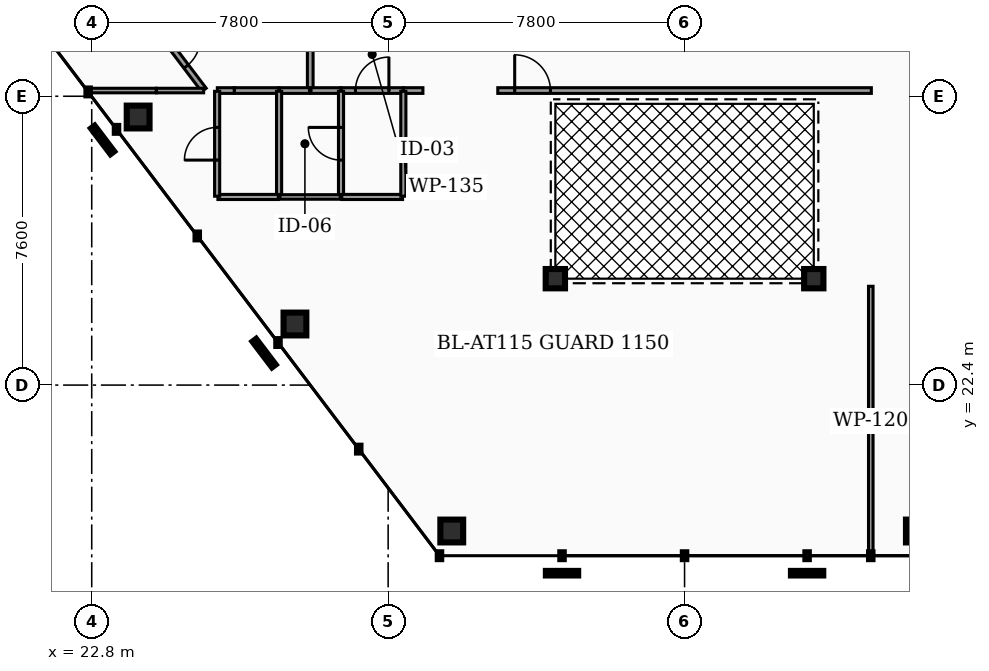
"""IFC4 building model, lengths in metres.
Left out: names, types, materials, properties, quantities, classifications, styles, units other than length and angle.
Written with IfcOpenShell. Run it as: python <this file> out.ifc"""

import sys

from ifc_helpers import new_model, si_unit, direction, frame, frame_2d, origin, origin_2d, place, context, subcontext, project, spatial, rectangle, hollow_rectangle, hollow_circle, extrude, element, fill, save


model = new_model("IFC4")
c1 = context("Model", 3, precision=1e-05, world=origin(), true_north=direction((0.0, 1.0)))
c2 = subcontext(c1, "Body", "Model", "MODEL_VIEW")
j1 = project(units=[si_unit("LENGTHUNIT", "METRE"), si_unit("PLANEANGLEUNIT", "RADIAN")], contexts=[c1])
p1 = place(None, origin())
s1 = spatial("IfcSite", under=j1, at=p1, CompositionType="ELEMENT")
p2 = place(p1, origin())
s2 = spatial("IfcBuilding", under=s1, at=p2, CompositionType="ELEMENT")
p3 = place(p2, frame((0.0, 0.0, 208.76)))
s3 = spatial("IfcBuildingStorey", under=s2, at=p3, CompositionType="ELEMENT", Elevation=208.76)
for number, where, z_axis, x_axis in (
    (1, (24.021, 29.454, 0.0), (0.0, 0.0, 1.0), (1.0, 0.0, 0.0)),
    (2, (28.148, 24.007, 0.0), (0.0, 0.0, 1.0), (1.0, 0.0, 0.0)),
    (3, (32.274, 18.561, 0.0), (0.0, 0.0, 1.0), (1.0, 0.0, 0.0)),
    (4, (44.526, 18.561, 0.0), (0.0, 0.0, 1.0), (1.0, 0.0, 0.0)),
):
    element("IfcColumn", number, at=place(p3, frame(where, z_axis=z_axis, x_axis=x_axis)), inside=s3, PredefinedType="COLUMN", context=c2, shape_type="SweptSolid", body=[
        extrude(hollow_rectangle(XDim=0.6, YDim=0.6, WallThickness=0.03, at=origin_2d()), origin(), (0.0, 0.0, 1.0), 3.18),
    ])
for number, where, z_axis, x_axis in (
    (5, (35.0, 25.2, 0.0), (0.0, 0.0, 1.0), (1.0, 0.0, 0.0)),
    (6, (41.8, 25.2, 0.0), (0.0, 0.0, 1.0), (1.0, 0.0, 0.0)),
):
    element("IfcColumn", number, at=place(p3, frame(where, z_axis=z_axis, x_axis=x_axis)), inside=s3, PredefinedType="COLUMN", context=c2, shape_type="SweptSolid", body=[
        extrude(hollow_circle(Radius=0.254, WallThickness=0.02, at=origin_2d()), origin(), (0.0, 0.0, 1.0), 3.18),
    ])
p4 = place(p3, frame((28.55, 30.17, 0.0), z_axis=(0.0, 0.0, 1.0), x_axis=(0.0, 1.0, 0.0)))
e7 = element("IfcWall", 7, at=p4, inside=s3, PredefinedType="PARTITIONING", context=c2, shape_type="SweptSolid", body=[
    extrude(rectangle(XDim=3.06, YDim=0.15, at=frame_2d((1.53, 0.0))), origin(), (0.0, 0.0, 1.0), 2.235),
])
p5 = place(p4, frame((1.06, 0.0, 0.0)))
e8 = element("IfcOpeningElement", 8, at=p5, cuts=e7, PredefinedType="OPENING", context=c2, shape_type="SweptSolid", body=[
    extrude(rectangle(XDim=0.94, YDim=2.05, at=frame_2d((0.47, 1.025))), frame((0.0, 0.085, 0.0), z_axis=(0.0, -1.0, 0.0), x_axis=(1.0, 0.0, 0.0)), (0.0, 0.0, 1.0), 0.17),
])
p6 = place(p3, frame((29.365, 30.15, 0.0), z_axis=(0.0, 0.0, 1.0), x_axis=(1.0, 0.0, 0.0)))
e9 = element("IfcWall", 9, at=p6, inside=s3, PredefinedType="PARTITIONING", context=c2, shape_type="SweptSolid", body=[
    extrude(rectangle(XDim=1.63, YDim=0.15, at=frame_2d((0.815, 0.0))), origin(), (0.0, 0.0, 1.0), 2.235),
])
p7 = place(p6, frame((0.375, 0.0, 0.0)))
e10 = element("IfcOpeningElement", 10, at=p7, cuts=e9, PredefinedType="OPENING", context=c2, shape_type="SweptSolid", body=[
    extrude(rectangle(XDim=0.88, YDim=2.05, at=frame_2d((0.44, 1.025))), frame((0.0, 0.085, 0.0), z_axis=(0.0, -1.0, 0.0), x_axis=(1.0, 0.0, 0.0)), (0.0, 0.0, 1.0), 0.17),
])
p8 = place(p3, frame((28.57, 30.15, 0.0), z_axis=(0.0, 0.0, 1.0), x_axis=(1.0, 0.0, 0.0)))
e11 = element("IfcWall", 11, at=p8, inside=s3, PredefinedType="PARTITIONING", context=c2, shape_type="SweptSolid", body=[
    extrude(rectangle(XDim=0.785, YDim=0.15, at=frame_2d((0.393, 0.0))), origin(), (0.0, 0.0, 1.0), 2.235),
])
p9 = place(p3, frame((33.485, 30.15, 0.0), z_axis=(0.0, 0.0, 1.0), x_axis=(1.0, 0.0, 0.0)))
e12 = element("IfcWall", 12, at=p9, inside=s3, PredefinedType="PARTITIONING", context=c2, shape_type="SweptSolid", body=[
    extrude(rectangle(XDim=9.83, YDim=0.15, at=frame_2d((4.915, 0.0))), origin(), (0.0, 0.0, 1.0), 2.235),
])
p10 = place(p9, frame((0.445, 0.0, 0.0)))
e13 = element("IfcOpeningElement", 13, at=p10, cuts=e12, PredefinedType="OPENING", context=c2, shape_type="SweptSolid", body=[
    extrude(rectangle(XDim=0.94, YDim=2.05, at=frame_2d((0.47, 1.025))), frame((0.0, 0.085, 0.0), z_axis=(0.0, -1.0, 0.0), x_axis=(1.0, 0.0, 0.0)), (0.0, 0.0, 1.0), 0.17),
])
p11 = place(p3, frame((31.005, 30.15, 0.0), z_axis=(0.0, 0.0, 1.0), x_axis=(1.0, 0.0, 0.0)))
e14 = element("IfcWall", 14, at=p11, inside=s3, PredefinedType="PARTITIONING", context=c2, shape_type="SweptSolid", body=[
    extrude(rectangle(XDim=0.51, YDim=0.15, at=frame_2d((0.255, 0.0))), origin(), (0.0, 0.0, 1.0), 2.235),
])
p12 = place(p3, frame((26.55, 30.15, 0.0), z_axis=(0.0, 0.0, 1.0), x_axis=(1.0, 0.0, 0.0)))
e15 = element("IfcWall", 15, at=p12, inside=s3, PredefinedType="PARTITIONING", context=c2, shape_type="SweptSolid", body=[
    extrude(rectangle(XDim=1.175, YDim=0.15, at=frame_2d((0.587, 0.0))), origin(), (0.0, 0.0, 1.0), 2.235),
])
p13 = place(p3, frame((26.105, 30.15, 0.0), z_axis=(0.0, 0.0, 1.0), x_axis=(1.0, 0.0, 0.0)))
e16 = element("IfcWall", 16, at=p13, inside=s3, PredefinedType="PARTITIONING", context=c2, shape_type="SweptSolid", body=[
    extrude(rectangle(XDim=0.445, YDim=0.15, at=frame_2d((0.223, 0.0))), origin(), (0.0, 0.0, 1.0), 2.235),
])
p14 = place(p3, frame((27.735, 30.15, 0.0), z_axis=(0.0, 0.0, 1.0), x_axis=(1.0, 0.0, 0.0)))
e17 = element("IfcWall", 17, at=p14, inside=s3, PredefinedType="PARTITIONING", context=c2, shape_type="SweptSolid", body=[
    extrude(rectangle(XDim=0.795, YDim=0.15, at=frame_2d((0.397, 0.0))), origin(), (0.0, 0.0, 1.0), 2.235),
])
p15 = place(p3, frame((24.25, 32.15, 0.0), z_axis=(0.0, 0.0, 1.0), x_axis=(0.60385391082, -0.797095009637, 0.0)))
e18 = element("IfcWall", 18, at=p15, inside=s3, PredefinedType="PARTITIONING", context=c2, shape_type="SweptSolid", body=[
    extrude(rectangle(XDim=2.489, YDim=0.15, at=frame_2d((1.245, 0.0))), origin(), (0.0, 0.0, 1.0), 2.235),
])
p16 = place(p15, frame((0.775, 0.0, 0.0)))
e19 = element("IfcOpeningElement", 19, at=p16, cuts=e18, PredefinedType="OPENING", context=c2, shape_type="SweptSolid", body=[
    extrude(rectangle(XDim=0.94, YDim=2.05, at=frame_2d((0.47, 1.025))), frame((0.0, 0.085, 0.0), z_axis=(0.0, -1.0, 0.0), x_axis=(1.0, 0.0, 0.0)), (0.0, 0.0, 1.0), 0.17),
])
p17 = place(p3, frame((29.36, 27.37, 0.0), z_axis=(0.0, 0.0, 1.0), x_axis=(0.0, 1.0, 0.0)))
e20 = element("IfcWall", 20, at=p17, inside=s3, PredefinedType="PARTITIONING", context=c2, shape_type="SweptSolid", body=[
    extrude(rectangle(XDim=2.76, YDim=0.135, at=frame_2d((1.38, 0.0))), origin(), (0.0, 0.0, 1.0), 2.235),
])
p18 = place(p17, frame((0.95, 0.0, 0.0)))
e21 = element("IfcOpeningElement", 21, at=p18, cuts=e20, PredefinedType="OPENING", context=c2, shape_type="SweptSolid", body=[
    extrude(rectangle(XDim=0.86, YDim=2.05, at=frame_2d((0.43, 1.025))), frame((0.0, 0.077, 0.0), z_axis=(0.0, -1.0, 0.0), x_axis=(1.0, 0.0, 0.0)), (0.0, 0.0, 1.0), 0.155),
])
p19 = place(p3, frame((29.38, 27.35, 0.0), z_axis=(0.0, 0.0, 1.0), x_axis=(1.0, 0.0, 0.0)))
e22 = element("IfcWall", 22, at=p19, inside=s3, PredefinedType="PARTITIONING", context=c2, shape_type="SweptSolid", body=[
    extrude(rectangle(XDim=1.6, YDim=0.135, at=frame_2d((0.8, 0.0))), origin(), (0.0, 0.0, 1.0), 2.235),
])
for number, where, z_axis, x_axis in (
    (23, (31.0, 27.37, 0.0), (0.0, 0.0, 1.0), (0.0, 1.0, 0.0)),
    (24, (27.73, 27.37, 0.0), (0.0, 0.0, 1.0), (0.0, 1.0, 0.0)),
):
    element("IfcWall", number, at=place(p3, frame(where, z_axis=z_axis, x_axis=x_axis)), inside=s3, PredefinedType="PARTITIONING", context=c2, shape_type="SweptSolid", body=[
        extrude(rectangle(XDim=2.76, YDim=0.135, at=frame_2d((1.38, 0.0))), origin(), (0.0, 0.0, 1.0), 2.235),
    ])
p20 = place(p3, frame((26.12, 27.35, 0.0), z_axis=(0.0, 0.0, 1.0), x_axis=(1.0, 0.0, 0.0)))
e25 = element("IfcWall", 25, at=p20, inside=s3, PredefinedType="PARTITIONING", context=c2, shape_type="SweptSolid", body=[
    extrude(rectangle(XDim=1.59, YDim=0.135, at=frame_2d((0.795, 0.0))), origin(), (0.0, 0.0, 1.0), 2.235),
])
p21 = place(p3, frame((26.1, 27.37, 0.0), z_axis=(0.0, 0.0, 1.0), x_axis=(0.0, 1.0, 0.0)))
e26 = element("IfcWall", 26, at=p21, inside=s3, PredefinedType="PARTITIONING", context=c2, shape_type="SweptSolid", body=[
    extrude(rectangle(XDim=2.76, YDim=0.135, at=frame_2d((1.38, 0.0))), origin(), (0.0, 0.0, 1.0), 2.235),
])
p22 = place(p21, frame((0.95, 0.0, 0.0)))
e27 = element("IfcOpeningElement", 27, at=p22, cuts=e26, PredefinedType="OPENING", context=c2, shape_type="SweptSolid", body=[
    extrude(rectangle(XDim=0.86, YDim=2.05, at=frame_2d((0.43, 1.025))), frame((0.0, 0.077, 0.0), z_axis=(0.0, -1.0, 0.0), x_axis=(1.0, 0.0, 0.0)), (0.0, 0.0, 1.0), 0.155),
])
p23 = place(p3, frame((27.75, 27.35, 0.0), z_axis=(0.0, 0.0, 1.0), x_axis=(1.0, 0.0, 0.0)))
e28 = element("IfcWall", 28, at=p23, inside=s3, PredefinedType="PARTITIONING", context=c2, shape_type="SweptSolid", body=[
    extrude(rectangle(XDim=1.59, YDim=0.12, at=frame_2d((0.795, 0.0))), origin(), (0.0, 0.0, 1.0), 2.235),
])
p24 = place(p3, frame((43.3, 17.926, 0.0), z_axis=(0.0, 0.0, 1.0), x_axis=(0.0, 1.0, 0.0)))
e29 = element("IfcWall", 29, at=p24, inside=s3, PredefinedType="PARTITIONING", context=c2, shape_type="SweptSolid", body=[
    extrude(rectangle(XDim=7.074, YDim=0.12, at=frame_2d((3.537, 0.0))), origin(), (0.0, 0.0, 1.0), 2.235),
])
p25 = place(p3, frame((24.5, 30.15, 0.0), z_axis=(0.0, 0.0, 1.0), x_axis=(1.0, 0.0, 0.0)))
e30 = element("IfcWall", 30, at=p25, inside=s3, PredefinedType="PARTITIONING", context=c2, shape_type="SweptSolid", body=[
    extrude(rectangle(XDim=1.245, YDim=0.12, at=frame_2d((0.623, 0.0))), origin(), (0.0, 0.0, 1.0), 2.235),
])
p26 = place(p3, frame((22.694, 30.15, 0.0), z_axis=(0.0, 0.0, 1.0), x_axis=(1.0, 0.0, 0.0)))
e31 = element("IfcWall", 31, at=p26, inside=s3, PredefinedType="PARTITIONING", context=c2, shape_type="SweptSolid", body=[
    extrude(rectangle(XDim=1.806, YDim=0.12, at=frame_2d((0.903, 0.0))), origin(), (0.0, 0.0, 1.0), 2.235),
])
p27 = place(p7, origin())
e32 = element("IfcDoor", 32, at=p27, inside=s3, OperationType="SINGLE_SWING_RIGHT", PredefinedType="DOOR", context=c2, shape_type="SweptSolid", body=[
    extrude(rectangle(XDim=0.88, YDim=2.05, at=frame_2d((0.44, 1.025))), frame((0.0, 0.025, 0.0), z_axis=(0.0, -1.0, 0.0), x_axis=(1.0, 0.0, 0.0)), (0.0, 0.0, 1.0), 0.05),
])
fill(e10, e32)
p28 = place(p10, origin())
e33 = element("IfcDoor", 33, at=p28, inside=s3, OperationType="SINGLE_SWING_LEFT", PredefinedType="DOOR", context=c2, shape_type="SweptSolid", body=[
    extrude(rectangle(XDim=0.94, YDim=2.05, at=frame_2d((0.47, 1.025))), frame((0.0, 0.025, 0.0), z_axis=(0.0, -1.0, 0.0), x_axis=(1.0, 0.0, 0.0)), (0.0, 0.0, 1.0), 0.05),
])
fill(e13, e33)
p29 = place(p16, origin())
e34 = element("IfcDoor", 34, at=p29, inside=s3, OperationType="SINGLE_SWING_LEFT", PredefinedType="DOOR", context=c2, shape_type="SweptSolid", body=[
    extrude(rectangle(XDim=0.94, YDim=2.05, at=frame_2d((0.47, 1.025))), frame((0.0, 0.025, 0.0), z_axis=(0.0, -1.0, 0.0), x_axis=(1.0, 0.0, 0.0)), (0.0, 0.0, 1.0), 0.05),
])
fill(e19, e34)
p30 = place(p18, origin())
e35 = element("IfcDoor", 35, at=p30, inside=s3, OperationType="SINGLE_SWING_RIGHT", PredefinedType="DOOR", context=c2, shape_type="SweptSolid", body=[
    extrude(rectangle(XDim=0.86, YDim=2.05, at=frame_2d((0.43, 1.025))), frame((0.0, 0.025, 0.0), z_axis=(0.0, -1.0, 0.0), x_axis=(1.0, 0.0, 0.0)), (0.0, 0.0, 1.0), 0.05),
])
fill(e21, e35)
p31 = place(p22, origin())
e36 = element("IfcDoor", 36, at=p31, inside=s3, OperationType="SINGLE_SWING_LEFT", PredefinedType="DOOR", context=c2, shape_type="SweptSolid", body=[
    extrude(rectangle(XDim=0.86, YDim=2.05, at=frame_2d((0.43, 1.025))), frame((0.0, 0.025, 0.0), z_axis=(0.0, -1.0, 0.0), x_axis=(1.0, 0.0, 0.0)), (0.0, 0.0, 1.0), 0.05),
])
fill(e27, e36)
save(model, sys.argv[1])
